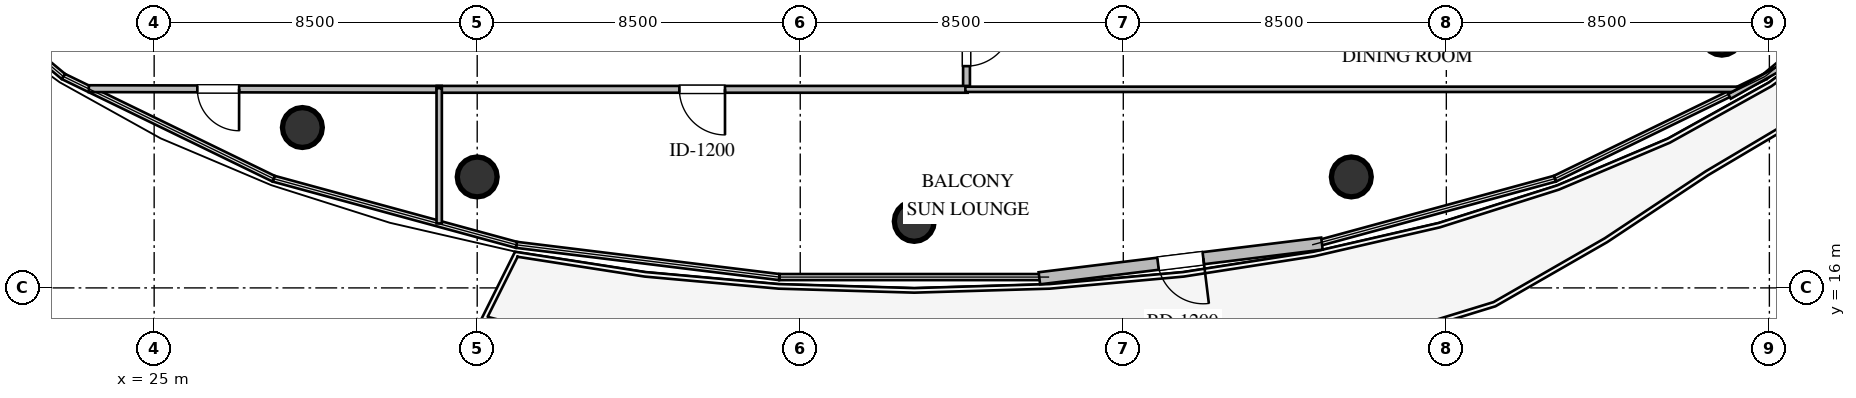
"""IFC4 building model, lengths in metres.
Left out: names, types, materials, properties, quantities, classifications, styles, units other than length and angle.
Written with IfcOpenShell. Run it as: python <this file> out.ifc"""

import sys

from ifc_helpers import new_model, si_unit, direction, frame, frame_2d, origin, origin_2d, place, context, subcontext, project, spatial, rectangle, circle, extrude, element, fill, save


model = new_model("IFC4")
c1 = context("Model", 3, precision=1e-05, world=origin(), true_north=direction((0.0, 1.0)))
c2 = subcontext(c1, "Body", "Model", "MODEL_VIEW")
j1 = project(units=[si_unit("LENGTHUNIT", "METRE"), si_unit("PLANEANGLEUNIT", "RADIAN")], contexts=[c1])
p1 = place(None, origin())
s1 = spatial("IfcSite", under=j1, at=p1, CompositionType="ELEMENT")
p2 = place(p1, origin())
s2 = spatial("IfcBuilding", under=s1, at=p2, CompositionType="ELEMENT")
p3 = place(p2, frame((0.0, 0.0, 249.6)))
s3 = spatial("IfcBuildingStorey", under=s2, at=p3, CompositionType="ELEMENT", Elevation=249.6)
for number, where, z_axis, x_axis in (
    (1, (28.9, 20.22, 0.0), (0.0, 0.0, 1.0), (1.0, 0.0, 0.0)),
    (2, (33.5, 18.92, 0.0), (0.0, 0.0, 1.0), (1.0, 0.0, 0.0)),
    (3, (45.0, 17.75, 0.0), (0.0, 0.0, 1.0), (1.0, 0.0, 0.0)),
    (4, (56.5, 18.92, 0.0), (0.0, 0.0, 1.0), (1.0, 0.0, 0.0)),
    (5, (66.25, 22.65, 0.0), (0.0, 0.0, 1.0), (1.0, 0.0, 0.0)),
):
    element("IfcColumn", number, at=place(p3, frame(where, z_axis=z_axis, x_axis=x_axis)), inside=s3, PredefinedType="COLUMN", context=c2, shape_type="SweptSolid", body=[
        extrude(circle(Radius=0.525, at=origin_2d()), origin(), (0.0, 0.0, 1.0), 3.6),
    ])
p4 = place(p3, frame((55.727, 17.165, 0.0), z_axis=(0.0, 0.0, 1.0), x_axis=(-0.992559081031, -0.121763995755, 0.0)))
e6 = element("IfcWall", 6, at=p4, inside=s3, PredefinedType="STANDARD", context=c2, shape_type="SweptSolid", body=[
    extrude(rectangle(XDim=7.491, YDim=0.32, at=frame_2d((3.745, 0.0))), origin(), (0.0, 0.0, 1.0), 3.28),
])
p5 = place(p4, frame((3.145, 0.0, 0.0)))
e7 = element("IfcOpeningElement", 7, at=p5, cuts=e6, PredefinedType="OPENING", context=c2, shape_type="SweptSolid", body=[
    extrude(rectangle(XDim=1.2, YDim=2.15, at=frame_2d((0.6, 1.075))), frame((0.0, 0.17, 0.0), z_axis=(0.0, -1.0, 0.0), x_axis=(1.0, 0.0, 0.0)), (0.0, 0.0, 1.0), 0.34),
])
p6 = place(p3, frame((46.375, 23.675, 0.0), z_axis=(0.0, 0.0, 1.0), x_axis=(0.0, -1.0, 0.0)))
e8 = element("IfcWall", 8, at=p6, inside=s3, PredefinedType="PARTITIONING", context=c2, shape_type="SweptSolid", body=[
    extrude(rectangle(XDim=2.48, YDim=0.18, at=frame_2d((1.24, 0.0))), origin(), (0.0, 0.0, 1.0), 3.28),
])
p7 = place(p6, frame((0.64, 0.0, 0.0)))
e9 = element("IfcOpeningElement", 9, at=p7, cuts=e8, PredefinedType="OPENING", context=c2, shape_type="SweptSolid", body=[
    extrude(rectangle(XDim=1.2, YDim=2.15, at=frame_2d((0.6, 1.075))), frame((0.0, 0.1, 0.0), z_axis=(0.0, -1.0, 0.0), x_axis=(1.0, 0.0, 0.0)), (0.0, 0.0, 1.0), 0.2),
])
p8 = place(p3, frame((32.565, 21.225, 0.0), z_axis=(0.0, 0.0, 1.0), x_axis=(-0.999998305737, 0.001840794209, 0.0)))
e10 = element("IfcWall", 10, at=p8, inside=s3, PredefinedType="PARTITIONING", context=c2, shape_type="SweptSolid", body=[
    extrude(rectangle(XDim=9.284, YDim=0.18, at=frame_2d((4.642, 0.0))), origin(), (0.0, 0.0, 1.0), 2.726),
])
p9 = place(p8, frame((5.329, 0.0, 0.0)))
e11 = element("IfcOpeningElement", 11, at=p9, cuts=e10, PredefinedType="OPENING", context=c2, shape_type="SweptSolid", body=[
    extrude(rectangle(XDim=1.1, YDim=2.1, at=frame_2d((0.55, 1.05))), frame((0.0, 0.1, 0.0), z_axis=(0.0, -1.0, 0.0), x_axis=(1.0, 0.0, 0.0)), (0.0, 0.0, 1.0), 0.2),
])
p10 = place(p3, frame((46.405, 21.225, 0.0), z_axis=(0.0, 0.0, 1.0), x_axis=(-1.0, 0.0, 0.0)))
e12 = element("IfcWall", 12, at=p10, inside=s3, PredefinedType="PARTITIONING", context=c2, shape_type="SweptSolid", body=[
    extrude(rectangle(XDim=13.97, YDim=0.18, at=frame_2d((6.985, 0.0))), origin(), (0.0, 0.0, 1.0), 2.916),
])
p11 = place(p10, frame((6.385, 0.0, 0.0)))
e13 = element("IfcOpeningElement", 13, at=p11, cuts=e12, PredefinedType="OPENING", context=c2, shape_type="SweptSolid", body=[
    extrude(rectangle(XDim=1.2, YDim=2.15, at=frame_2d((0.6, 1.075))), frame((0.0, 0.1, 0.0), z_axis=(0.0, -1.0, 0.0), x_axis=(1.0, 0.0, 0.0)), (0.0, 0.0, 1.0), 0.2),
])
p12 = place(p3, frame((66.684, 21.225, 0.0), z_axis=(0.0, 0.0, 1.0), x_axis=(-1.0, 0.0, 0.0)))
e14 = element("IfcWall", 14, at=p12, inside=s3, PredefinedType="PARTITIONING", context=c2, shape_type="SweptSolid", body=[
    extrude(rectangle(XDim=20.339, YDim=0.14, at=frame_2d((10.169, 0.0))), origin(), (0.0, 0.0, 1.0), 2.916),
])
p13 = place(p3, frame((67.748, 21.77, 0.0), z_axis=(0.0, 0.0, 1.0), x_axis=(-0.871352238731, -0.490658003153, 0.0)))
e15 = element("IfcWall", 15, at=p13, inside=s3, PredefinedType="PARTITIONING", context=c2, shape_type="SweptSolid", body=[
    extrude(rectangle(XDim=1.49, YDim=0.14, at=frame_2d((0.745, 0.0))), origin(), (0.0, 0.0, 1.0), 3.28),
])
p14 = place(p3, frame((32.5, 21.255, 0.0), z_axis=(0.0, 0.0, 1.0), x_axis=(0.0, -1.0, 0.0)))
e16 = element("IfcWall", 16, at=p14, inside=s3, PredefinedType="PARTITIONING", context=c2, shape_type="SweptSolid", body=[
    extrude(rectangle(XDim=3.559, YDim=0.14, at=frame_2d((1.779, 0.0))), origin(), (0.0, 0.0, 1.0), 3.28),
])
p15 = place(p5, origin())
e17 = element("IfcDoor", 17, at=p15, inside=s3, OperationType="SINGLE_SWING_LEFT", PredefinedType="DOOR", context=c2, shape_type="SweptSolid", body=[
    extrude(rectangle(XDim=1.2, YDim=2.15, at=frame_2d((0.6, 1.075))), frame((0.0, 0.025, 0.0), z_axis=(0.0, -1.0, 0.0), x_axis=(1.0, 0.0, 0.0)), (0.0, 0.0, 1.0), 0.05),
])
fill(e7, e17)
p16 = place(p7, origin())
e18 = element("IfcDoor", 18, at=p16, inside=s3, OperationType="SINGLE_SWING_LEFT", PredefinedType="DOOR", context=c2, shape_type="SweptSolid", body=[
    extrude(rectangle(XDim=1.2, YDim=2.15, at=frame_2d((0.6, 1.075))), frame((0.0, 0.025, 0.0), z_axis=(0.0, -1.0, 0.0), x_axis=(1.0, 0.0, 0.0)), (0.0, 0.0, 1.0), 0.05),
])
fill(e9, e18)
p17 = place(p9, origin())
e19 = element("IfcDoor", 19, at=p17, inside=s3, OperationType="SINGLE_SWING_LEFT", PredefinedType="DOOR", context=c2, shape_type="SweptSolid", body=[
    extrude(rectangle(XDim=1.1, YDim=2.1, at=frame_2d((0.55, 1.05))), frame((0.0, 0.025, 0.0), z_axis=(0.0, -1.0, 0.0), x_axis=(1.0, 0.0, 0.0)), (0.0, 0.0, 1.0), 0.05),
])
fill(e11, e19)
p18 = place(p11, origin())
e20 = element("IfcDoor", 20, at=p18, inside=s3, OperationType="SINGLE_SWING_LEFT", PredefinedType="DOOR", context=c2, shape_type="SweptSolid", body=[
    extrude(rectangle(XDim=1.2, YDim=2.15, at=frame_2d((0.6, 1.075))), frame((0.0, 0.025, 0.0), z_axis=(0.0, -1.0, 0.0), x_axis=(1.0, 0.0, 0.0)), (0.0, 0.0, 1.0), 0.05),
])
fill(e13, e20)
save(model, sys.argv[1])
